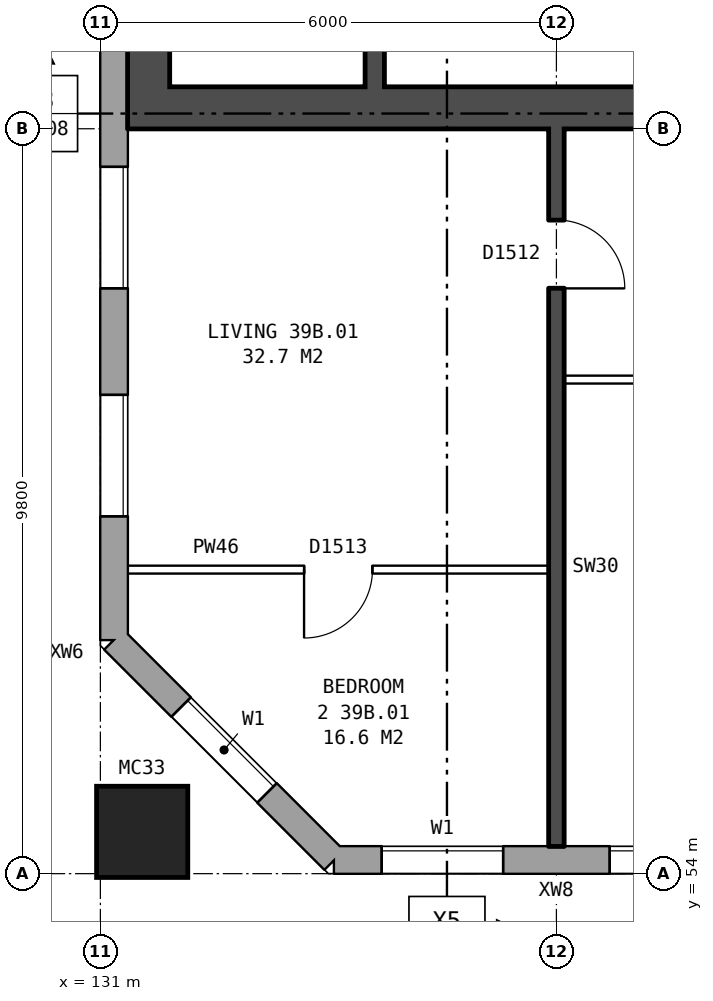
"""IFC4 building model, lengths in metres.
Left out: names, types, materials, properties, quantities, classifications, styles, units other than length and angle.
Written with IfcOpenShell. Run it as: python <this file> out.ifc"""

import sys

from ifc_helpers import new_model, si_unit, direction, frame, frame_2d, origin, origin_2d, place, context, subcontext, project, spatial, rectangle, hollow_rectangle, extrude, element, fill, save


model = new_model("IFC4")
c1 = context("Model", 3, precision=1e-05, world=origin(), true_north=direction((0.0, 1.0)))
c2 = subcontext(c1, "Body", "Model", "MODEL_VIEW")
j1 = project(units=[si_unit("LENGTHUNIT", "METRE"), si_unit("PLANEANGLEUNIT", "RADIAN")], contexts=[c1])
p1 = place(None, origin())
s1 = spatial("IfcSite", under=j1, at=p1, CompositionType="ELEMENT")
p2 = place(p1, origin())
s2 = spatial("IfcBuilding", under=s1, at=p2, CompositionType="ELEMENT")
p3 = place(p2, frame((0.0, 0.0, 139.2)))
s3 = spatial("IfcBuildingStorey", under=s2, at=p3, CompositionType="ELEMENT", Elevation=139.2)
p4 = place(p3, frame((131.55, 54.55, 0.0), z_axis=(0.0, 0.0, 1.0), x_axis=(1.0, 0.0, 0.0)))
e1 = element("IfcColumn", 1, at=p4, inside=s3, PredefinedType="COLUMN", context=c2, shape_type="SweptSolid", body=[
    extrude(hollow_rectangle(XDim=1.2, YDim=1.2, WallThickness=0.065, at=origin_2d()), origin(), (0.0, 0.0, 1.0), 3.1),
])
p5 = place(p3, frame((131.18, 57.075, 0.0), z_axis=(0.0, 0.0, 1.0), x_axis=(0.707106781187, -0.707106781187, 0.0)))
e2 = element("IfcWall", 2, at=p5, inside=s3, PredefinedType="STANDARD", context=c2, shape_type="SweptSolid", body=[
    extrude(rectangle(XDim=4.094, YDim=0.36, at=frame_2d((2.047, 0.0))), origin(), (0.0, 0.0, 1.0), 2.85),
])
p6 = place(p5, frame((1.247, 0.0, 0.8)))
e3 = element("IfcOpeningElement", 3, at=p6, cuts=e2, PredefinedType="OPENING", context=c2, shape_type="SweptSolid", body=[
    extrude(rectangle(XDim=1.6, YDim=1.8, at=frame_2d((0.8, 0.9))), frame((0.0, 0.19, 0.0), z_axis=(0.0, -1.0, 0.0), x_axis=(1.0, 0.0, 0.0)), (0.0, 0.0, 1.0), 0.38),
])
p7 = place(p3, frame((134.075, 54.18, 0.0), z_axis=(0.0, 0.0, 1.0), x_axis=(1.0, 0.0, 0.0)))
e4 = element("IfcWall", 4, at=p7, inside=s3, PredefinedType="STANDARD", context=c2, shape_type="SweptSolid", body=[
    extrude(rectangle(XDim=35.601, YDim=0.36, at=frame_2d((17.8, 0.0))), origin(), (0.0, 0.0, 1.0), 2.85),
])
p8 = place(p7, frame((0.625, 0.0, 0.8)))
e5 = element("IfcOpeningElement", 5, at=p8, cuts=e4, PredefinedType="OPENING", context=c2, shape_type="SweptSolid", body=[
    extrude(rectangle(XDim=1.6, YDim=1.8, at=frame_2d((0.8, 0.9))), frame((0.0, 0.19, 0.0), z_axis=(0.0, -1.0, 0.0), x_axis=(1.0, 0.0, 0.0)), (0.0, 0.0, 1.0), 0.38),
])
p9 = place(p7, frame((3.625, 0.0, 0.8)))
e6 = element("IfcOpeningElement", 6, at=p9, cuts=e4, PredefinedType="OPENING", context=c2, shape_type="SweptSolid", body=[
    extrude(rectangle(XDim=1.6, YDim=1.8, at=frame_2d((0.8, 0.9))), frame((0.0, 0.19, 0.0), z_axis=(0.0, -1.0, 0.0), x_axis=(1.0, 0.0, 0.0)), (0.0, 0.0, 1.0), 0.38),
])
p10 = place(p7, frame((6.625, 0.0, 0.8)))
e7 = element("IfcOpeningElement", 7, at=p10, cuts=e4, PredefinedType="OPENING", context=c2, shape_type="SweptSolid", body=[
    extrude(rectangle(XDim=1.6, YDim=1.8, at=frame_2d((0.8, 0.9))), frame((0.0, 0.19, 0.0), z_axis=(0.0, -1.0, 0.0), x_axis=(1.0, 0.0, 0.0)), (0.0, 0.0, 1.0), 0.38),
])
p11 = place(p7, frame((9.625, 0.0, 0.8)))
e8 = element("IfcOpeningElement", 8, at=p11, cuts=e4, PredefinedType="OPENING", context=c2, shape_type="SweptSolid", body=[
    extrude(rectangle(XDim=1.6, YDim=1.8, at=frame_2d((0.8, 0.9))), frame((0.0, 0.19, 0.0), z_axis=(0.0, -1.0, 0.0), x_axis=(1.0, 0.0, 0.0)), (0.0, 0.0, 1.0), 0.38),
])
p12 = place(p7, frame((12.625, 0.0, 0.8)))
e9 = element("IfcOpeningElement", 9, at=p12, cuts=e4, PredefinedType="OPENING", context=c2, shape_type="SweptSolid", body=[
    extrude(rectangle(XDim=1.6, YDim=1.8, at=frame_2d((0.8, 0.9))), frame((0.0, 0.19, 0.0), z_axis=(0.0, -1.0, 0.0), x_axis=(1.0, 0.0, 0.0)), (0.0, 0.0, 1.0), 0.38),
])
p13 = place(p7, frame((15.125, 0.0, 1.25)))
e10 = element("IfcOpeningElement", 10, at=p13, cuts=e4, PredefinedType="OPENING", context=c2, shape_type="SweptSolid", body=[
    extrude(rectangle(XDim=0.8, YDim=1.2, at=frame_2d((0.4, 0.6))), frame((0.0, 0.19, 0.0), z_axis=(0.0, -1.0, 0.0), x_axis=(1.0, 0.0, 0.0)), (0.0, 0.0, 1.0), 0.38),
])
p14 = place(p7, frame((18.075, 0.0, 0.25)))
e11 = element("IfcOpeningElement", 11, at=p14, cuts=e4, PredefinedType="OPENING", context=c2, shape_type="SweptSolid", body=[
    extrude(rectangle(XDim=0.6, YDim=0.9, at=frame_2d((0.3, 0.45))), frame((0.0, 0.19, 0.0), z_axis=(0.0, -1.0, 0.0), x_axis=(1.0, 0.0, 0.0)), (0.0, 0.0, 1.0), 0.38),
])
p15 = place(p7, frame((21.625, 0.0, 0.8)))
e12 = element("IfcOpeningElement", 12, at=p15, cuts=e4, PredefinedType="OPENING", context=c2, shape_type="SweptSolid", body=[
    extrude(rectangle(XDim=1.6, YDim=1.8, at=frame_2d((0.8, 0.9))), frame((0.0, 0.19, 0.0), z_axis=(0.0, -1.0, 0.0), x_axis=(1.0, 0.0, 0.0)), (0.0, 0.0, 1.0), 0.38),
])
p16 = place(p7, frame((24.625, 0.0, 0.8)))
e13 = element("IfcOpeningElement", 13, at=p16, cuts=e4, PredefinedType="OPENING", context=c2, shape_type="SweptSolid", body=[
    extrude(rectangle(XDim=1.6, YDim=1.8, at=frame_2d((0.8, 0.9))), frame((0.0, 0.19, 0.0), z_axis=(0.0, -1.0, 0.0), x_axis=(1.0, 0.0, 0.0)), (0.0, 0.0, 1.0), 0.38),
])
p17 = place(p7, frame((27.625, 0.0, 0.8)))
e14 = element("IfcOpeningElement", 14, at=p17, cuts=e4, PredefinedType="OPENING", context=c2, shape_type="SweptSolid", body=[
    extrude(rectangle(XDim=1.6, YDim=1.8, at=frame_2d((0.8, 0.9))), frame((0.0, 0.19, 0.0), z_axis=(0.0, -1.0, 0.0), x_axis=(1.0, 0.0, 0.0)), (0.0, 0.0, 1.0), 0.38),
])
p18 = place(p7, frame((30.625, 0.0, 0.8)))
e15 = element("IfcOpeningElement", 15, at=p18, cuts=e4, PredefinedType="OPENING", context=c2, shape_type="SweptSolid", body=[
    extrude(rectangle(XDim=1.6, YDim=1.8, at=frame_2d((0.8, 0.9))), frame((0.0, 0.19, 0.0), z_axis=(0.0, -1.0, 0.0), x_axis=(1.0, 0.0, 0.0)), (0.0, 0.0, 1.0), 0.38),
])
p19 = place(p7, frame((33.625, 0.0, 0.8)))
e16 = element("IfcOpeningElement", 16, at=p19, cuts=e4, PredefinedType="OPENING", context=c2, shape_type="SweptSolid", body=[
    extrude(rectangle(XDim=1.6, YDim=1.8, at=frame_2d((0.8, 0.9))), frame((0.0, 0.19, 0.0), z_axis=(0.0, -1.0, 0.0), x_axis=(1.0, 0.0, 0.0)), (0.0, 0.0, 1.0), 0.38),
])
p20 = place(p7, frame((16.825, 0.0, 0.15)))
e17 = element("IfcOpeningElement", 17, at=p20, cuts=e4, PredefinedType="OPENING", context=c2, shape_type="SweptSolid", body=[
    extrude(rectangle(XDim=0.8, YDim=0.9, at=frame_2d((0.4, 0.45))), frame((0.0, 0.19, 0.0), z_axis=(0.0, -1.0, 0.0), x_axis=(1.0, 0.0, 0.0)), (0.0, 0.0, 1.0), 0.38),
])
p21 = place(p7, frame((19.325, 0.0, 1.65)))
e18 = element("IfcOpeningElement", 18, at=p21, cuts=e4, PredefinedType="OPENING", context=c2, shape_type="SweptSolid", body=[
    extrude(rectangle(XDim=1.4, YDim=0.9, at=frame_2d((0.7, 0.45))), frame((0.0, 0.19, 0.0), z_axis=(0.0, -1.0, 0.0), x_axis=(1.0, 0.0, 0.0)), (0.0, 0.0, 1.0), 0.38),
])
p22 = place(p3, frame((131.18, 82.925, 0.0), z_axis=(0.0, 0.0, 1.0), x_axis=(0.0, -1.0, 0.0)))
e19 = element("IfcWall", 19, at=p22, inside=s3, PredefinedType="STANDARD", context=c2, shape_type="SweptSolid", body=[
    extrude(rectangle(XDim=25.851, YDim=0.36, at=frame_2d((12.925, 0.0))), origin(), (0.0, 0.0, 1.0), 2.85),
])
p23 = place(p22, frame((1.625, 0.0, 0.8)))
e20 = element("IfcOpeningElement", 20, at=p23, cuts=e19, PredefinedType="OPENING", context=c2, shape_type="SweptSolid", body=[
    extrude(rectangle(XDim=1.6, YDim=1.8, at=frame_2d((0.8, 0.9))), frame((0.0, 0.19, 0.0), z_axis=(0.0, -1.0, 0.0), x_axis=(1.0, 0.0, 0.0)), (0.0, 0.0, 1.0), 0.38),
])
p24 = place(p22, frame((4.625, 0.0, 0.8)))
e21 = element("IfcOpeningElement", 21, at=p24, cuts=e19, PredefinedType="OPENING", context=c2, shape_type="SweptSolid", body=[
    extrude(rectangle(XDim=1.6, YDim=1.8, at=frame_2d((0.8, 0.9))), frame((0.0, 0.19, 0.0), z_axis=(0.0, -1.0, 0.0), x_axis=(1.0, 0.0, 0.0)), (0.0, 0.0, 1.0), 0.38),
])
p25 = place(p22, frame((19.625, 0.0, 0.8)))
e22 = element("IfcOpeningElement", 22, at=p25, cuts=e19, PredefinedType="OPENING", context=c2, shape_type="SweptSolid", body=[
    extrude(rectangle(XDim=1.6, YDim=1.8, at=frame_2d((0.8, 0.9))), frame((0.0, 0.19, 0.0), z_axis=(0.0, -1.0, 0.0), x_axis=(1.0, 0.0, 0.0)), (0.0, 0.0, 1.0), 0.38),
])
p26 = place(p22, frame((22.625, 0.0, 0.8)))
e23 = element("IfcOpeningElement", 23, at=p26, cuts=e19, PredefinedType="OPENING", context=c2, shape_type="SweptSolid", body=[
    extrude(rectangle(XDim=1.6, YDim=1.8, at=frame_2d((0.8, 0.9))), frame((0.0, 0.19, 0.0), z_axis=(0.0, -1.0, 0.0), x_axis=(1.0, 0.0, 0.0)), (0.0, 0.0, 1.0), 0.38),
])
p27 = place(p3, frame((131.635, 63.8, 0.0), z_axis=(0.0, 0.0, 1.0), x_axis=(0.0, 1.0, 0.0)))
e24 = element("IfcWall", 24, at=p27, inside=s3, PredefinedType="SHEAR", context=c2, shape_type="SweptSolid", body=[
    extrude(rectangle(XDim=12.4, YDim=0.55, at=frame_2d((6.2, 0.0))), origin(), (0.0, 0.0, 1.0), 2.85),
])
p28 = place(p3, frame((139.21, 64.075, 0.0), z_axis=(0.0, 0.0, 1.0), x_axis=(-1.0, 0.0, 0.0)))
e25 = element("IfcWall", 25, at=p28, inside=s3, PredefinedType="SHEAR", context=c2, shape_type="SweptSolid", body=[
    extrude(rectangle(XDim=7.3, YDim=0.55, at=frame_2d((3.65, 0.0))), origin(), (0.0, 0.0, 1.0), 2.85),
])
p29 = place(p3, frame((134.61, 64.35, 0.0), z_axis=(0.0, 0.0, 1.0), x_axis=(0.0, 1.0, 0.0)))
e26 = element("IfcWall", 26, at=p29, inside=s3, PredefinedType="SHEAR", context=c2, shape_type="SweptSolid", body=[
    extrude(rectangle(XDim=6.775, YDim=0.25, at=frame_2d((3.387, 0.0))), origin(), (0.0, 0.0, 1.0), 2.85),
])
p30 = place(p3, frame((131.36, 58.0, 0.0), z_axis=(0.0, 0.0, 1.0), x_axis=(1.0, 0.0, 0.0)))
e27 = element("IfcWall", 27, at=p30, inside=s3, PredefinedType="PARTITIONING", context=c2, shape_type="SweptSolid", body=[
    extrude(rectangle(XDim=5.54, YDim=0.1, at=frame_2d((2.77, 0.0))), origin(), (0.0, 0.0, 1.0), 2.85),
])
p31 = place(p30, frame((2.32, 0.0, 0.0)))
e28 = element("IfcOpeningElement", 28, at=p31, cuts=e27, PredefinedType="OPENING", context=c2, shape_type="SweptSolid", body=[
    extrude(rectangle(XDim=0.9, YDim=2.1, at=frame_2d((0.45, 1.05))), frame((0.0, 0.06, 0.0), z_axis=(0.0, -1.0, 0.0), x_axis=(1.0, 0.0, 0.0)), (0.0, 0.0, 1.0), 0.12),
])
p32 = place(p3, frame((137.1, 60.5, 0.0), z_axis=(0.0, 0.0, 1.0), x_axis=(1.0, 0.0, 0.0)))
e29 = element("IfcWall", 29, at=p32, inside=s3, PredefinedType="PARTITIONING", context=c2, shape_type="SweptSolid", body=[
    extrude(rectangle(XDim=5.8, YDim=0.1, at=frame_2d((2.9, 0.0))), origin(), (0.0, 0.0, 1.0), 2.85),
])
p33 = place(p32, frame((1.3, 0.0, 0.0)))
e30 = element("IfcOpeningElement", 30, at=p33, cuts=e29, PredefinedType="OPENING", context=c2, shape_type="SweptSolid", body=[
    extrude(rectangle(XDim=0.9, YDim=2.1, at=frame_2d((0.45, 1.05))), frame((0.0, 0.06, 0.0), z_axis=(0.0, -1.0, 0.0), x_axis=(1.0, 0.0, 0.0)), (0.0, 0.0, 1.0), 0.12),
])
p34 = place(p32, frame((4.2, 0.0, 0.0)))
e31 = element("IfcOpeningElement", 31, at=p34, cuts=e29, PredefinedType="OPENING", context=c2, shape_type="SweptSolid", body=[
    extrude(rectangle(XDim=0.9, YDim=2.1, at=frame_2d((0.45, 1.05))), frame((0.0, 0.06, 0.0), z_axis=(0.0, -1.0, 0.0), x_axis=(1.0, 0.0, 0.0)), (0.0, 0.0, 1.0), 0.12),
])
p35 = place(p3, frame((137.0, 54.36, 0.0), z_axis=(0.0, 0.0, 1.0), x_axis=(0.0, 1.0, 0.0)))
e32 = element("IfcWall", 32, at=p35, inside=s3, PredefinedType="SOLIDWALL", context=c2, shape_type="SweptSolid", body=[
    extrude(rectangle(XDim=9.44, YDim=0.2, at=frame_2d((4.72, 0.0))), origin(), (0.0, 0.0, 1.0), 2.85),
])
p36 = place(p35, frame((7.34, 0.0, 0.0)))
e33 = element("IfcOpeningElement", 33, at=p36, cuts=e32, PredefinedType="OPENING", context=c2, shape_type="SweptSolid", body=[
    extrude(rectangle(XDim=0.9, YDim=2.1, at=frame_2d((0.45, 1.05))), frame((0.0, 0.11, 0.0), z_axis=(0.0, -1.0, 0.0), x_axis=(1.0, 0.0, 0.0)), (0.0, 0.0, 1.0), 0.22),
])
p37 = place(p6, origin())
e34 = element("IfcWindow", 34, at=p37, inside=s3, PartitioningType="SINGLE_PANEL", PredefinedType="WINDOW", context=c2, shape_type="SweptSolid", body=[
    extrude(rectangle(XDim=1.6, YDim=1.8, at=frame_2d((0.8, 0.9))), frame((0.0, 0.15, 0.0), z_axis=(0.0, -1.0, 0.0), x_axis=(1.0, 0.0, 0.0)), (0.0, 0.0, 1.0), 0.06),
])
fill(e3, e34)
p38 = place(p8, origin())
e35 = element("IfcWindow", 35, at=p38, inside=s3, PartitioningType="SINGLE_PANEL", PredefinedType="WINDOW", context=c2, shape_type="SweptSolid", body=[
    extrude(rectangle(XDim=1.6, YDim=1.8, at=frame_2d((0.8, 0.9))), frame((0.0, 0.15, 0.0), z_axis=(0.0, -1.0, 0.0), x_axis=(1.0, 0.0, 0.0)), (0.0, 0.0, 1.0), 0.06),
])
fill(e5, e35)
p39 = place(p9, origin())
e36 = element("IfcWindow", 36, at=p39, inside=s3, PartitioningType="SINGLE_PANEL", PredefinedType="WINDOW", context=c2, shape_type="SweptSolid", body=[
    extrude(rectangle(XDim=1.6, YDim=1.8, at=frame_2d((0.8, 0.9))), frame((0.0, 0.15, 0.0), z_axis=(0.0, -1.0, 0.0), x_axis=(1.0, 0.0, 0.0)), (0.0, 0.0, 1.0), 0.06),
])
fill(e6, e36)
p40 = place(p25, origin())
e37 = element("IfcWindow", 37, at=p40, inside=s3, PartitioningType="SINGLE_PANEL", PredefinedType="WINDOW", context=c2, shape_type="SweptSolid", body=[
    extrude(rectangle(XDim=1.6, YDim=1.8, at=frame_2d((0.8, 0.9))), frame((0.0, 0.15, 0.0), z_axis=(0.0, -1.0, 0.0), x_axis=(1.0, 0.0, 0.0)), (0.0, 0.0, 1.0), 0.06),
])
fill(e22, e37)
p41 = place(p26, origin())
e38 = element("IfcWindow", 38, at=p41, inside=s3, PartitioningType="SINGLE_PANEL", PredefinedType="WINDOW", context=c2, shape_type="SweptSolid", body=[
    extrude(rectangle(XDim=1.6, YDim=1.8, at=frame_2d((0.8, 0.9))), frame((0.0, 0.15, 0.0), z_axis=(0.0, -1.0, 0.0), x_axis=(1.0, 0.0, 0.0)), (0.0, 0.0, 1.0), 0.06),
])
fill(e23, e38)
p42 = place(p31, frame((0.9, 0.0, 0.0), z_axis=(0.0, 0.0, 1.0), x_axis=(-1.0, 0.0, 0.0)))
e39 = element("IfcDoor", 39, at=p42, inside=s3, OperationType="SINGLE_SWING_RIGHT", PredefinedType="DOOR", context=c2, shape_type="SweptSolid", body=[
    extrude(rectangle(XDim=0.9, YDim=2.1, at=frame_2d((0.45, 1.05))), frame((0.0, 0.025, 0.0), z_axis=(0.0, -1.0, 0.0), x_axis=(1.0, 0.0, 0.0)), (0.0, 0.0, 1.0), 0.05),
])
fill(e28, e39)
p43 = place(p36, frame((0.9, 0.0, 0.0), z_axis=(0.0, 0.0, 1.0), x_axis=(-1.0, 0.0, 0.0)))
e40 = element("IfcDoor", 40, at=p43, inside=s3, OperationType="SINGLE_SWING_RIGHT", PredefinedType="DOOR", context=c2, shape_type="SweptSolid", body=[
    extrude(rectangle(XDim=0.9, YDim=2.1, at=frame_2d((0.45, 1.05))), frame((0.0, 0.025, 0.0), z_axis=(0.0, -1.0, 0.0), x_axis=(1.0, 0.0, 0.0)), (0.0, 0.0, 1.0), 0.05),
])
fill(e33, e40)
save(model, sys.argv[1])
